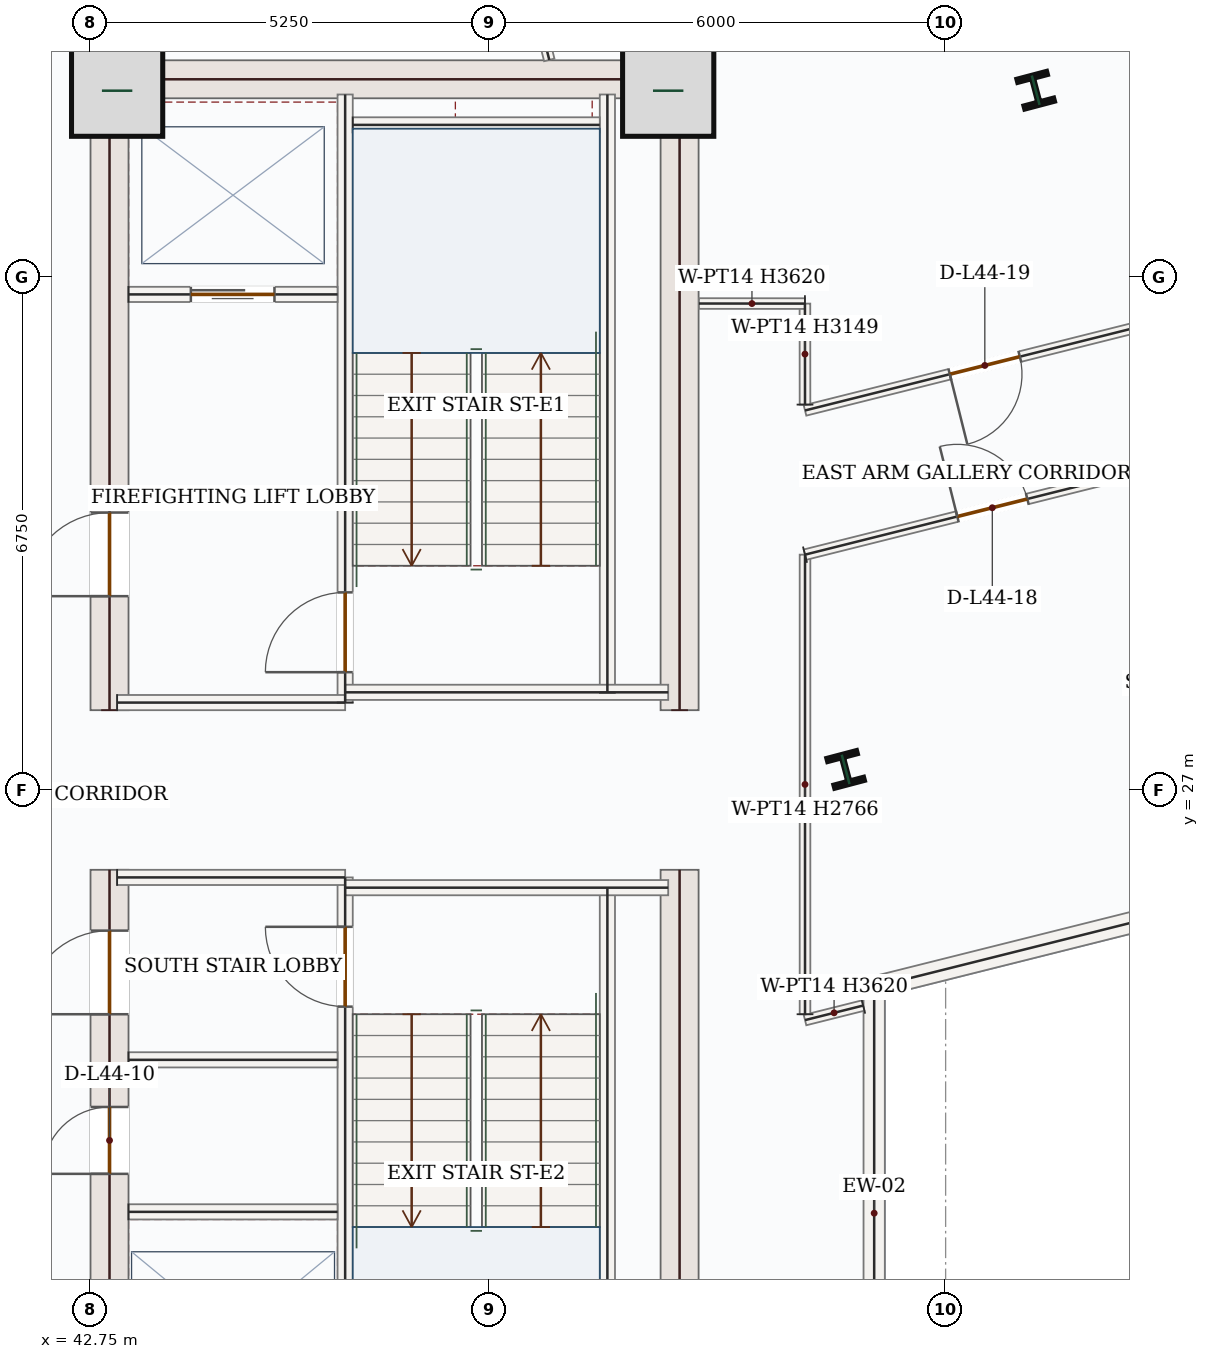
"""IFC4 building model, lengths in metres.
Left out: names, types, materials, properties, quantities, classifications, styles, units other than length and angle.
Written with IfcOpenShell. Run it as: python <this file> out.ifc"""

import sys

from ifc_helpers import new_model, si_unit, direction, frame, frame_2d, origin, origin_2d, place, context, subcontext, project, spatial, rectangle, i_section, extrude, source, transform, mapped, element, fill, save


model = new_model("IFC4")
c1 = context("Model", 3, precision=1e-05, world=origin(), true_north=direction((0.0, 1.0)))
c2 = subcontext(c1, "Body", "Model", "MODEL_VIEW")
j1 = project(units=[si_unit("LENGTHUNIT", "METRE"), si_unit("PLANEANGLEUNIT", "RADIAN")], contexts=[c1])
p1 = place(None, origin())
s1 = spatial("IfcSite", under=j1, at=p1, CompositionType="ELEMENT")
p2 = place(p1, origin())
s2 = spatial("IfcBuilding", under=s1, at=p2, CompositionType="ELEMENT")
p3 = place(p2, frame((0.0, 0.0, 190.2)))
s3 = spatial("IfcBuildingStorey", under=s2, at=p3, CompositionType="ELEMENT", Elevation=190.2)
p4 = place(p3, frame((43.0, 17.4, 0.0), z_axis=(0.0, 0.0, 1.0), x_axis=(0.0, 1.0, 0.0)))
e1 = element("IfcWall", 1, at=p4, inside=s3, PredefinedType="SHEAR", context=c2, shape_type="SweptSolid", body=[
    extrude(rectangle(XDim=8.55, YDim=0.5, at=frame_2d((4.275, 0.0))), origin(), (0.0, 0.0, 1.0), 3.62),
])
p5 = place(p4, frame((6.65, 0.0, 0.0)))
e2 = element("IfcOpeningElement", 2, at=p5, cuts=e1, PredefinedType="OPENING", context=c2, shape_type="SweptSolid", body=[
    extrude(rectangle(XDim=1.1, YDim=2.2, at=frame_2d((0.55, 1.1))), frame((0.0, 0.26, 0.0), z_axis=(0.0, -1.0, 0.0), x_axis=(1.0, 0.0, 0.0)), (0.0, 0.0, 1.0), 0.52),
])
p6 = place(p4, frame((1.75, 0.0, 0.0)))
e3 = element("IfcOpeningElement", 3, at=p6, cuts=e1, PredefinedType="OPENING", context=c2, shape_type="SweptSolid", body=[
    extrude(rectangle(XDim=1.3, YDim=2.2, at=frame_2d((0.65, 1.1))), frame((0.0, 0.26, 0.0), z_axis=(0.0, -1.0, 0.0), x_axis=(1.0, 0.0, 0.0)), (0.0, 0.0, 1.0), 0.52),
])
p7 = place(p4, frame((4.55, 0.0, 0.0)))
e4 = element("IfcOpeningElement", 4, at=p7, cuts=e1, PredefinedType="OPENING", context=c2, shape_type="SweptSolid", body=[
    extrude(rectangle(XDim=0.88, YDim=2.1, at=frame_2d((0.44, 1.05))), frame((0.0, 0.26, 0.0), z_axis=(0.0, -1.0, 0.0), x_axis=(1.0, 0.0, 0.0)), (0.0, 0.0, 1.0), 0.52),
])
p8 = place(p3, frame((43.0, 28.05, 0.0), z_axis=(0.0, 0.0, 1.0), x_axis=(0.0, 1.0, 0.0)))
e5 = element("IfcWall", 5, at=p8, inside=s3, PredefinedType="SHEAR", context=c2, shape_type="SweptSolid", body=[
    extrude(rectangle(XDim=8.55, YDim=0.5, at=frame_2d((4.275, 0.0))), origin(), (0.0, 0.0, 1.0), 3.62),
])
p9 = place(p8, frame((1.5, 0.0, 0.0)))
e6 = element("IfcOpeningElement", 6, at=p9, cuts=e5, PredefinedType="OPENING", context=c2, shape_type="SweptSolid", body=[
    extrude(rectangle(XDim=1.1, YDim=2.2, at=frame_2d((0.55, 1.1))), frame((0.0, 0.26, 0.0), z_axis=(0.0, -1.0, 0.0), x_axis=(1.0, 0.0, 0.0)), (0.0, 0.0, 1.0), 0.52),
])
m1 = source(origin(), c2, "Body", "SweptSolid", [
    extrude(rectangle(XDim=8.55, YDim=0.5, at=frame_2d((4.275, 0.0))), origin(), (0.0, 0.0, 1.0), 3.62),
])
for number, where, z_axis, x_axis in (
    (7, (50.5, 17.4, 0.0), (0.0, 0.0, 1.0), (0.0, 1.0, 0.0)),
    (8, (50.5, 28.05, 0.0), (0.0, 0.0, 1.0), (0.0, 1.0, 0.0)),
):
    element("IfcWall", number, at=place(p3, frame(where, z_axis=z_axis, x_axis=x_axis)), inside=s3, PredefinedType="SHEAR", context=c2, shape_type="MappedRepresentation", body=[
        mapped(m1, transform((0.0, 0.0, 0.0), x_axis=(1.0, 0.0, 0.0), y_axis=(0.0, 1.0, 0.0), z_axis=(0.0, 0.0, 1.0), scale=1.0)),
    ])
m2 = source(origin(), c2, "Body", "SweptSolid", [
    extrude(rectangle(XDim=7.0, YDim=0.5, at=frame_2d((3.5, 0.0))), origin(), (0.0, 0.0, 1.0), 3.62),
])
p10 = place(p3, frame((43.25, 36.35, 0.0), z_axis=(0.0, 0.0, 1.0), x_axis=(1.0, 0.0, 0.0)))
e9 = element("IfcWall", 9, at=p10, inside=s3, PredefinedType="SHEAR", context=c2, shape_type="MappedRepresentation", body=[
    mapped(m2, transform((0.0, 0.0, 0.0), x_axis=(1.0, 0.0, 0.0), y_axis=(0.0, 1.0, 0.0), z_axis=(0.0, 0.0, 1.0), scale=1.0)),
])
m3 = source(origin(), c2, "Body", "SweptSolid", [
    extrude(rectangle(XDim=1.2, YDim=1.2, at=origin_2d()), origin(), (0.0, 0.0, 1.0), 3.9),
])
for number, where, z_axis, x_axis in (
    (10, (43.1, 36.2, 0.0), (0.0, 0.0, 1.0), (1.0, 0.0, 0.0)),
    (11, (50.35, 36.2, 0.0), (0.0, 0.0, 1.0), (1.0, 0.0, 0.0)),
):
    element("IfcColumn", number, at=place(p3, frame(where, z_axis=z_axis, x_axis=x_axis)), inside=s3, PredefinedType="COLUMN", context=c2, shape_type="MappedRepresentation", body=[
        mapped(m3, transform((0.0, 0.0, 0.0), x_axis=(1.0, 0.0, 0.0), y_axis=(0.0, 1.0, 0.0), z_axis=(0.0, 0.0, 1.0), scale=1.0)),
    ])
m4 = source(origin(), c2, "Body", "SweptSolid", [
    extrude(i_section(OverallWidth=0.404, OverallDepth=0.407, WebThickness=0.027, FlangeThickness=0.044, FilletRadius=0.018, at=origin_2d()), origin(), (0.0, 0.0, 1.0), 3.9),
])
for number, where, z_axis, x_axis in (
    (12, (52.684, 27.271, 0.0), (0.0, 0.0, 1.0), (0.967, 0.255, 0.0)),
    (13, (55.185, 36.206, 0.0), (0.0, 0.0, 1.0), (0.967, 0.255, 0.0)),
):
    element("IfcColumn", number, at=place(p3, frame(where, z_axis=z_axis, x_axis=x_axis)), inside=s3, PredefinedType="COLUMN", context=c2, shape_type="MappedRepresentation", body=[
        mapped(m4, transform((0.0, 0.0, 0.0), x_axis=(1.0, 0.0, 0.0), y_axis=(0.0, 1.0, 0.0), z_axis=(0.0, 0.0, 1.0), scale=1.0)),
    ])
p11 = place(p3, frame((62.024, 26.652, 0.0), z_axis=(0.0, 0.0, 1.0), x_axis=(-0.970044513566, -0.242927235402, 0.0)))
e14 = element("IfcWall", 14, at=p11, inside=s3, PredefinedType="SOLIDWALL", context=c2, shape_type="SweptSolid", body=[
    extrude(rectangle(XDim=9.241, YDim=0.28, at=frame_2d((4.621, 0.0))), origin(), (0.0, 0.0, 1.0), 3.62),
])
p12 = place(p11, frame((3.721, 0.0, 0.85)))
e15 = element("IfcOpeningElement", 15, at=p12, cuts=e14, PredefinedType="OPENING", context=c2, shape_type="SweptSolid", body=[
    extrude(rectangle(XDim=1.8, YDim=1.75, at=frame_2d((0.9, 0.875))), frame((0.0, 0.15, 0.0), z_axis=(0.0, -1.0, 0.0), x_axis=(1.0, 0.0, 0.0)), (0.0, 0.0, 1.0), 0.3),
])
m5 = source(origin(), c2, "Body", "SweptSolid", [
    extrude(rectangle(XDim=5.949, YDim=0.28, at=frame_2d((2.975, 0.0))), origin(), (0.0, 0.0, 1.0), 3.62),
])
p13 = place(p3, frame((53.06, 24.407, 0.0), z_axis=(0.0, 0.0, 1.0), x_axis=(0.0, -1.0, 0.0)))
e16 = element("IfcWall", 16, at=p13, inside=s3, PredefinedType="SOLIDWALL", context=c2, shape_type="MappedRepresentation", body=[
    mapped(m5, transform((0.0, 0.0, 0.0), x_axis=(1.0, 0.0, 0.0), y_axis=(0.0, 1.0, 0.0), z_axis=(0.0, 0.0, 1.0), scale=1.0)),
])
m6 = source(origin(), c2, "Body", "SweptSolid", [
    extrude(rectangle(XDim=7.87, YDim=0.2, at=frame_2d((3.935, 0.0))), origin(), (0.0, 0.0, 1.0), 3.62),
])
for number, where, z_axis, x_axis in (
    (17, (49.55, 17.85, 0.0), (0.0, 0.0, 1.0), (0.0, 1.0, 0.0)),
    (18, (49.55, 28.28, 0.0), (0.0, 0.0, 1.0), (0.0, 1.0, 0.0)),
):
    element("IfcWall", number, at=place(p3, frame(where, z_axis=z_axis, x_axis=x_axis)), inside=s3, PredefinedType="SOLIDWALL", context=c2, shape_type="MappedRepresentation", body=[
        mapped(m6, transform((0.0, 0.0, 0.0), x_axis=(1.0, 0.0, 0.0), y_axis=(0.0, 1.0, 0.0), z_axis=(0.0, 0.0, 1.0), scale=1.0)),
    ])
p14 = place(p3, frame((46.1, 17.85, 0.0), z_axis=(0.0, 0.0, 1.0), x_axis=(0.0, 1.0, 0.0)))
e19 = element("IfcWall", 19, at=p14, inside=s3, PredefinedType="SOLIDWALL", context=c2, shape_type="SweptSolid", body=[
    extrude(rectangle(XDim=8.0, YDim=0.2, at=frame_2d((4.0, 0.0))), origin(), (0.0, 0.0, 1.0), 3.62),
])
p15 = place(p14, frame((6.3, 0.0, 0.0)))
e20 = element("IfcOpeningElement", 20, at=p15, cuts=e19, PredefinedType="OPENING", context=c2, shape_type="SweptSolid", body=[
    extrude(rectangle(XDim=1.05, YDim=2.15, at=frame_2d((0.525, 1.075))), frame((0.0, 0.11, 0.0), z_axis=(0.0, -1.0, 0.0), x_axis=(1.0, 0.0, 0.0)), (0.0, 0.0, 1.0), 0.22),
])
p16 = place(p3, frame((46.1, 28.15, 0.0), z_axis=(0.0, 0.0, 1.0), x_axis=(0.0, 1.0, 0.0)))
e21 = element("IfcWall", 21, at=p16, inside=s3, PredefinedType="SOLIDWALL", context=c2, shape_type="SweptSolid", body=[
    extrude(rectangle(XDim=8.0, YDim=0.2, at=frame_2d((4.0, 0.0))), origin(), (0.0, 0.0, 1.0), 3.62),
])
p17 = place(p16, frame((0.4, 0.0, 0.0)))
e22 = element("IfcOpeningElement", 22, at=p17, cuts=e21, PredefinedType="OPENING", context=c2, shape_type="SweptSolid", body=[
    extrude(rectangle(XDim=1.05, YDim=2.15, at=frame_2d((0.525, 1.075))), frame((0.0, 0.11, 0.0), z_axis=(0.0, -1.0, 0.0), x_axis=(1.0, 0.0, 0.0)), (0.0, 0.0, 1.0), 0.22),
])
m7 = source(origin(), c2, "Body", "SweptSolid", [
    extrude(rectangle(XDim=3.0, YDim=0.2, at=frame_2d((1.5, 0.0))), origin(), (0.0, 0.0, 1.0), 3.62),
])
p18 = place(p3, frame((43.1, 25.85, 0.0), z_axis=(0.0, 0.0, 1.0), x_axis=(1.0, 0.0, 0.0)))
e23 = element("IfcWall", 23, at=p18, inside=s3, PredefinedType="SOLIDWALL", context=c2, shape_type="MappedRepresentation", body=[
    mapped(m7, transform((0.0, 0.0, 0.0), x_axis=(1.0, 0.0, 0.0), y_axis=(0.0, 1.0, 0.0), z_axis=(0.0, 0.0, 1.0), scale=1.0)),
])
m8 = source(origin(), c2, "Body", "SweptSolid", [
    extrude(rectangle(XDim=4.25, YDim=0.2, at=frame_2d((2.125, 0.0))), origin(), (0.0, 0.0, 1.0), 3.62),
])
p19 = place(p3, frame((46.1, 25.715, 0.0), z_axis=(0.0, 0.0, 1.0), x_axis=(1.0, 0.0, 0.0)))
e24 = element("IfcWall", 24, at=p19, inside=s3, PredefinedType="SOLIDWALL", context=c2, shape_type="MappedRepresentation", body=[
    mapped(m8, transform((0.0, 0.0, 0.0), x_axis=(1.0, 0.0, 0.0), y_axis=(0.0, 1.0, 0.0), z_axis=(0.0, 0.0, 1.0), scale=1.0)),
])
p20 = place(p3, frame((43.1, 28.15, 0.0), z_axis=(0.0, 0.0, 1.0), x_axis=(1.0, 0.0, 0.0)))
e25 = element("IfcWall", 25, at=p20, inside=s3, PredefinedType="SOLIDWALL", context=c2, shape_type="MappedRepresentation", body=[
    mapped(m7, transform((0.0, 0.0, 0.0), x_axis=(1.0, 0.0, 0.0), y_axis=(0.0, 1.0, 0.0), z_axis=(0.0, 0.0, 1.0), scale=1.0)),
])
p21 = place(p3, frame((46.1, 28.285, 0.0), z_axis=(0.0, 0.0, 1.0), x_axis=(1.0, 0.0, 0.0)))
e26 = element("IfcWall", 26, at=p21, inside=s3, PredefinedType="SOLIDWALL", context=c2, shape_type="MappedRepresentation", body=[
    mapped(m8, transform((0.0, 0.0, 0.0), x_axis=(1.0, 0.0, 0.0), y_axis=(0.0, 1.0, 0.0), z_axis=(0.0, 0.0, 1.0), scale=1.0)),
])
m9 = source(origin(), c2, "Body", "SweptSolid", [
    extrude(rectangle(XDim=3.25, YDim=0.2, at=frame_2d((1.625, 0.0))), origin(), (0.0, 0.0, 1.0), 3.62),
])
p22 = place(p3, frame((46.2, 35.75, 0.0), z_axis=(0.0, 0.0, 1.0), x_axis=(1.0, 0.0, 0.0)))
e27 = element("IfcWall", 27, at=p22, inside=s3, PredefinedType="SOLIDWALL", context=c2, shape_type="MappedRepresentation", body=[
    mapped(m9, transform((0.0, 0.0, 0.0), x_axis=(1.0, 0.0, 0.0), y_axis=(0.0, 1.0, 0.0), z_axis=(0.0, 0.0, 1.0), scale=1.0)),
])
p23 = place(p3, frame((43.25, 33.52, 0.0), z_axis=(0.0, 0.0, 1.0), x_axis=(1.0, 0.0, 0.0)))
e28 = element("IfcWall", 28, at=p23, inside=s3, PredefinedType="SOLIDWALL", context=c2, shape_type="SweptSolid", body=[
    extrude(rectangle(XDim=2.75, YDim=0.2, at=frame_2d((1.375, 0.0))), origin(), (0.0, 0.0, 1.0), 3.62),
])
p24 = place(p23, frame((0.82, 0.0, 0.0)))
e29 = element("IfcOpeningElement", 29, at=p24, cuts=e28, PredefinedType="OPENING", context=c2, shape_type="SweptSolid", body=[
    extrude(rectangle(XDim=1.1, YDim=2.15, at=frame_2d((0.55, 1.075))), frame((0.0, 0.11, 0.0), z_axis=(0.0, -1.0, 0.0), x_axis=(1.0, 0.0, 0.0)), (0.0, 0.0, 1.0), 0.22),
])
m10 = source(origin(), c2, "Body", "SweptSolid", [
    extrude(rectangle(XDim=2.75, YDim=0.2, at=frame_2d((1.375, 0.0))), origin(), (0.0, 0.0, 1.0), 3.62),
])
for number, where, z_axis, x_axis in (
    (30, (43.25, 23.45, 0.0), (0.0, 0.0, 1.0), (1.0, 0.0, 0.0)),
    (31, (43.25, 21.45, 0.0), (0.0, 0.0, 1.0), (1.0, 0.0, 0.0)),
):
    element("IfcWall", number, at=place(p3, frame(where, z_axis=z_axis, x_axis=x_axis)), inside=s3, PredefinedType="SOLIDWALL", context=c2, shape_type="MappedRepresentation", body=[
        mapped(m10, transform((0.0, 0.0, 0.0), x_axis=(1.0, 0.0, 0.0), y_axis=(0.0, 1.0, 0.0), z_axis=(0.0, 0.0, 1.0), scale=1.0)),
    ])
m11 = source(origin(), c2, "Body", "SweptSolid", [
    extrude(rectangle(XDim=2.588, YDim=0.14, at=frame_2d((1.294, 0.0))), origin(), (0.0, 0.0, 1.0), 3.62),
])
p25 = place(p3, frame((48.157, 39.115, 0.0), z_axis=(0.0, 0.0, 1.0), x_axis=(0.242957412811, -0.97003695577, 0.0)))
e32 = element("IfcWall", 32, at=p25, inside=s3, PredefinedType="PARTITIONING", context=c2, shape_type="MappedRepresentation", body=[
    mapped(m11, transform((0.0, 0.0, 0.0), x_axis=(1.0, 0.0, 0.0), y_axis=(0.0, 1.0, 0.0), z_axis=(0.0, 0.0, 1.0), scale=1.0)),
])
p26 = place(p3, frame((61.73, 34.392, 0.0), z_axis=(0.0, 0.0, 1.0), x_axis=(-0.970043536382, -0.242931137411, 0.0)))
e33 = element("IfcWall", 33, at=p26, inside=s3, PredefinedType="PARTITIONING", context=c2, shape_type="SweptSolid", body=[
    extrude(rectangle(XDim=9.876, YDim=0.14, at=frame_2d((4.938, 0.0))), origin(), (0.0, 0.0, 1.0), 3.62),
])
p27 = place(p26, frame((6.962, 0.0, 0.0)))
e34 = element("IfcOpeningElement", 34, at=p27, cuts=e33, PredefinedType="OPENING", context=c2, shape_type="SweptSolid", body=[
    extrude(rectangle(XDim=0.95, YDim=2.15, at=frame_2d((0.475, 1.075))), frame((0.0, 0.08, 0.0), z_axis=(0.0, -1.0, 0.0), x_axis=(1.0, 0.0, 0.0)), (0.0, 0.0, 1.0), 0.16),
])
m12 = source(origin(), c2, "Body", "SweptSolid", [
    extrude(rectangle(XDim=1.329, YDim=0.14, at=frame_2d((0.664, 0.0))), origin(), (0.0, 0.0, 1.0), 3.149),
])
p28 = place(p3, frame((52.15, 32.07, 0.0), z_axis=(0.0, 0.0, 1.0), x_axis=(-0.00073502369, 0.99999972987, 0.0)))
e35 = element("IfcWall", 35, at=p28, inside=s3, PredefinedType="PARTITIONING", context=c2, shape_type="MappedRepresentation", body=[
    mapped(m12, transform((0.0, 0.0, 0.0), x_axis=(1.0, 0.0, 0.0), y_axis=(0.0, 1.0, 0.0), z_axis=(0.0, 0.0, 1.0), scale=1.0)),
])
m13 = source(origin(), c2, "Body", "SweptSolid", [
    extrude(rectangle(XDim=1.394, YDim=0.14, at=frame_2d((0.697, 0.0))), origin(), (0.0, 0.0, 1.0), 3.62),
])
p29 = place(p3, frame((52.149, 33.399, 0.0), z_axis=(0.0, 0.0, 1.0), x_axis=(-0.999999754632, 0.000700525222, 0.0)))
e36 = element("IfcWall", 36, at=p29, inside=s3, PredefinedType="PARTITIONING", context=c2, shape_type="MappedRepresentation", body=[
    mapped(m13, transform((0.0, 0.0, 0.0), x_axis=(1.0, 0.0, 0.0), y_axis=(0.0, 1.0, 0.0), z_axis=(0.0, 0.0, 1.0), scale=1.0)),
])
m14 = source(origin(), c2, "Body", "SweptSolid", [
    extrude(rectangle(XDim=0.789, YDim=0.14, at=frame_2d((0.395, 0.0))), origin(), (0.0, 0.0, 1.0), 3.62),
])
p30 = place(p3, frame((52.915, 24.164, 0.0), z_axis=(0.0, 0.0, 1.0), x_axis=(-0.970033159667, -0.242972568711, 0.0)))
e37 = element("IfcWall", 37, at=p30, inside=s3, PredefinedType="PARTITIONING", context=c2, shape_type="MappedRepresentation", body=[
    mapped(m14, transform((0.0, 0.0, 0.0), x_axis=(1.0, 0.0, 0.0), y_axis=(0.0, 1.0, 0.0), z_axis=(0.0, 0.0, 1.0), scale=1.0)),
])
m15 = source(origin(), c2, "Body", "SweptSolid", [
    extrude(rectangle(XDim=6.046, YDim=0.14, at=frame_2d((3.023, 0.0))), origin(), (0.0, 0.0, 1.0), 2.766),
])
p31 = place(p3, frame((52.15, 24.05, 0.0), z_axis=(0.0, 0.0, 1.0), x_axis=(0.0, 1.0, 0.0)))
e38 = element("IfcWall", 38, at=p31, inside=s3, PredefinedType="PARTITIONING", context=c2, shape_type="MappedRepresentation", body=[
    mapped(m15, transform((0.0, 0.0, 0.0), x_axis=(1.0, 0.0, 0.0), y_axis=(0.0, 1.0, 0.0), z_axis=(0.0, 0.0, 1.0), scale=1.0)),
])
p32 = place(p3, frame((52.15, 30.096, 0.0), z_axis=(0.0, 0.0, 1.0), x_axis=(0.970040994122, 0.242941288635, 0.0)))
e39 = element("IfcWall", 39, at=p32, inside=s3, PredefinedType="PARTITIONING", context=c2, shape_type="SweptSolid", body=[
    extrude(rectangle(XDim=10.337, YDim=0.14, at=frame_2d((5.168, 0.0))), origin(), (0.0, 0.0, 1.0), 3.62),
])
p33 = place(p32, frame((2.065, 0.0, 0.0)))
e40 = element("IfcOpeningElement", 40, at=p33, cuts=e39, PredefinedType="OPENING", context=c2, shape_type="SweptSolid", body=[
    extrude(rectangle(XDim=0.95, YDim=2.15, at=frame_2d((0.475, 1.075))), frame((0.0, 0.08, 0.0), z_axis=(0.0, -1.0, 0.0), x_axis=(1.0, 0.0, 0.0)), (0.0, 0.0, 1.0), 0.16),
])
m16 = source(origin(), c2, "Body", "SweptSolid", [
    extrude(rectangle(XDim=1.05, YDim=2.15, at=frame_2d((0.525, 1.075))), frame((0.0, 0.025, 0.0), z_axis=(0.0, -1.0, 0.0), x_axis=(1.0, 0.0, 0.0)), (0.0, 0.0, 1.0), 0.05),
])
p34 = place(p17, origin())
e41 = element("IfcDoor", 41, at=p34, inside=s3, OperationType="SINGLE_SWING_LEFT", PredefinedType="DOOR", context=c2, shape_type="MappedRepresentation", body=[
    mapped(m16, transform((0.0, 0.0, 0.0), x_axis=(1.0, 0.0, 0.0), y_axis=(0.0, 1.0, 0.0), z_axis=(0.0, 0.0, 1.0), scale=1.0)),
])
fill(e22, e41)
p35 = place(p15, origin())
e42 = element("IfcDoor", 42, at=p35, inside=s3, OperationType="SINGLE_SWING_RIGHT", PredefinedType="DOOR", context=c2, shape_type="MappedRepresentation", body=[
    mapped(m16, transform((0.0, 0.0, 0.0), x_axis=(1.0, 0.0, 0.0), y_axis=(0.0, 1.0, 0.0), z_axis=(0.0, 0.0, 1.0), scale=1.0)),
])
fill(e20, e42)
m17 = source(origin(), c2, "Body", "SweptSolid", [
    extrude(rectangle(XDim=1.1, YDim=2.15, at=frame_2d((0.55, 1.075))), frame((0.0, 0.025, 0.0), z_axis=(0.0, -1.0, 0.0), x_axis=(1.0, 0.0, 0.0)), (0.0, 0.0, 1.0), 0.05),
])
p36 = place(p24, origin())
e43 = element("IfcDoor", 43, at=p36, inside=s3, OperationType="DOUBLE_DOOR_SLIDING", PredefinedType="DOOR", context=c2, shape_type="MappedRepresentation", body=[
    mapped(m17, transform((0.0, 0.0, 0.0), x_axis=(1.0, 0.0, 0.0), y_axis=(0.0, 1.0, 0.0), z_axis=(0.0, 0.0, 1.0), scale=1.0)),
])
fill(e29, e43)
m18 = source(origin(), c2, "Body", "SweptSolid", [
    extrude(rectangle(XDim=1.1, YDim=2.2, at=frame_2d((0.55, 1.1))), frame((0.0, 0.025, 0.0), z_axis=(0.0, -1.0, 0.0), x_axis=(1.0, 0.0, 0.0)), (0.0, 0.0, 1.0), 0.05),
])
p37 = place(p9, origin())
e44 = element("IfcDoor", 44, at=p37, inside=s3, OperationType="SINGLE_SWING_LEFT", PredefinedType="DOOR", context=c2, shape_type="MappedRepresentation", body=[
    mapped(m18, transform((0.0, 0.0, 0.0), x_axis=(1.0, 0.0, 0.0), y_axis=(0.0, 1.0, 0.0), z_axis=(0.0, 0.0, 1.0), scale=1.0)),
])
fill(e6, e44)
p38 = place(p5, origin())
e45 = element("IfcDoor", 45, at=p38, inside=s3, OperationType="SINGLE_SWING_LEFT", PredefinedType="DOOR", context=c2, shape_type="MappedRepresentation", body=[
    mapped(m18, transform((0.0, 0.0, 0.0), x_axis=(1.0, 0.0, 0.0), y_axis=(0.0, 1.0, 0.0), z_axis=(0.0, 0.0, 1.0), scale=1.0)),
])
fill(e2, e45)
m19 = source(origin(), c2, "Body", "SweptSolid", [
    extrude(rectangle(XDim=0.88, YDim=2.1, at=frame_2d((0.44, 1.05))), frame((0.0, 0.025, 0.0), z_axis=(0.0, -1.0, 0.0), x_axis=(1.0, 0.0, 0.0)), (0.0, 0.0, 1.0), 0.05),
])
p39 = place(p7, origin())
e46 = element("IfcDoor", 46, at=p39, inside=s3, OperationType="SINGLE_SWING_LEFT", PredefinedType="DOOR", context=c2, shape_type="MappedRepresentation", body=[
    mapped(m19, transform((0.0, 0.0, 0.0), x_axis=(1.0, 0.0, 0.0), y_axis=(0.0, 1.0, 0.0), z_axis=(0.0, 0.0, 1.0), scale=1.0)),
])
fill(e4, e46)
m20 = source(origin(), c2, "Body", "SweptSolid", [
    extrude(rectangle(XDim=0.95, YDim=2.15, at=frame_2d((0.475, 1.075))), frame((0.0, 0.025, 0.0), z_axis=(0.0, -1.0, 0.0), x_axis=(1.0, 0.0, 0.0)), (0.0, 0.0, 1.0), 0.05),
])
p40 = place(p33, origin())
e47 = element("IfcDoor", 47, at=p40, inside=s3, OperationType="SINGLE_SWING_LEFT", PredefinedType="DOOR", context=c2, shape_type="MappedRepresentation", body=[
    mapped(m20, transform((0.0, 0.0, 0.0), x_axis=(1.0, 0.0, 0.0), y_axis=(0.0, 1.0, 0.0), z_axis=(0.0, 0.0, 1.0), scale=1.0)),
])
fill(e40, e47)
p41 = place(p27, origin())
e48 = element("IfcDoor", 48, at=p41, inside=s3, OperationType="SINGLE_SWING_RIGHT", PredefinedType="DOOR", context=c2, shape_type="MappedRepresentation", body=[
    mapped(m20, transform((0.0, 0.0, 0.0), x_axis=(1.0, 0.0, 0.0), y_axis=(0.0, 1.0, 0.0), z_axis=(0.0, 0.0, 1.0), scale=1.0)),
])
fill(e34, e48)
save(model, sys.argv[1])
